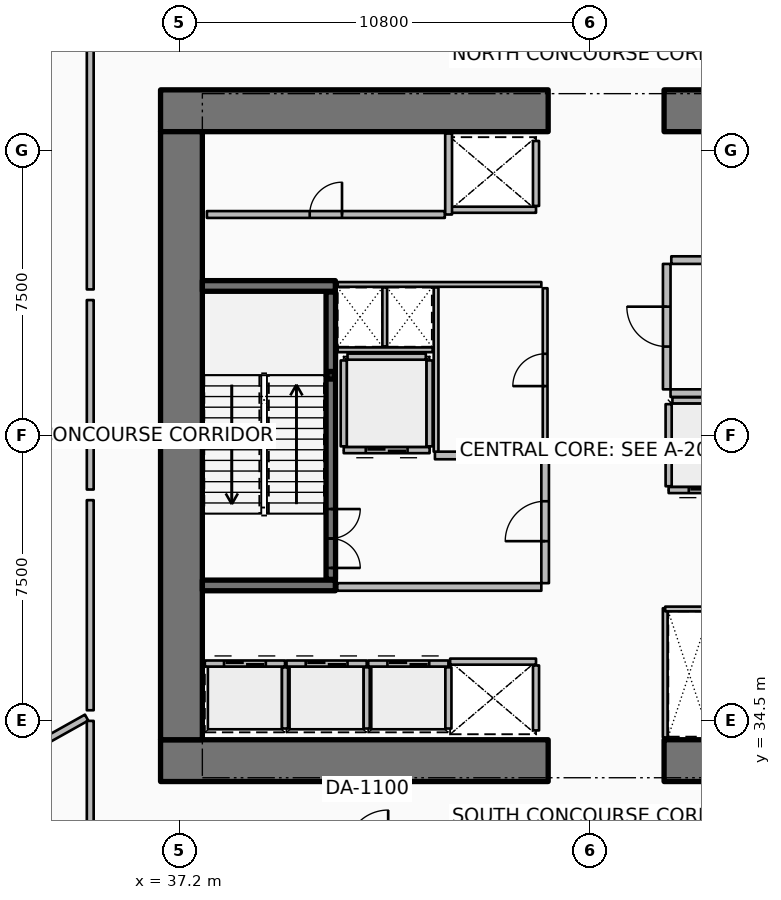
"""IFC4 building model, lengths in metres.
Left out: names, types, materials, properties, quantities, classifications, styles, units other than length and angle.
Written with IfcOpenShell. Run it as: python <this file> out.ifc"""

import sys

from ifc_helpers import new_model, si_unit, direction, frame, frame_2d, origin, origin_2d, place, context, subcontext, project, spatial, rectangle, hollow_rectangle, extrude, element, fill, save


model = new_model("IFC4")
c1 = context("Model", 3, precision=1e-05, world=origin(), true_north=direction((0.0, 1.0)))
c2 = subcontext(c1, "Body", "Model", "MODEL_VIEW")
j1 = project(units=[si_unit("LENGTHUNIT", "METRE"), si_unit("PLANEANGLEUNIT", "RADIAN")], contexts=[c1])
p1 = place(None, origin())
s1 = spatial("IfcSite", under=j1, at=p1, CompositionType="ELEMENT")
p2 = place(p1, origin())
s2 = spatial("IfcBuilding", under=s1, at=p2, CompositionType="ELEMENT")
p3 = place(p2, frame((0.0, 0.0, 21.6)))
s3 = spatial("IfcBuildingStorey", under=s2, at=p3, CompositionType="ELEMENT", Elevation=21.6)
for number, where, z_axis, x_axis in (
    (1, (36.7, 33.45, 0.0), (0.0, 0.0, 1.0), (1.0, 0.0, 0.0)),
    (2, (49.95, 33.45, 0.0), (0.0, 0.0, 1.0), (1.0, 0.0, 0.0)),
    (3, (36.7, 50.55, 0.0), (0.0, 0.0, 1.0), (1.0, 0.0, 0.0)),
    (4, (49.95, 50.55, 0.0), (0.0, 0.0, 1.0), (1.0, 0.0, 0.0)),
):
    element("IfcWall", number, at=place(p3, frame(where, z_axis=z_axis, x_axis=x_axis)), inside=s3, PredefinedType="SHEAR", context=c2, shape_type="SweptSolid", body=[
        extrude(rectangle(XDim=10.2, YDim=1.1, at=frame_2d((5.1, 0.0))), origin(), (0.0, 0.0, 1.0), 4.8),
    ])
p4 = place(p3, frame((37.25, 34.0, 0.0), z_axis=(0.0, 0.0, 1.0), x_axis=(0.0, 1.0, 0.0)))
e5 = element("IfcWall", 5, at=p4, inside=s3, PredefinedType="SHEAR", context=c2, shape_type="SweptSolid", body=[
    extrude(rectangle(XDim=16.0, YDim=1.1, at=frame_2d((8.0, 0.0))), origin(), (0.0, 0.0, 1.0), 4.8),
])
for number, where, z_axis, x_axis in (
    (6, (37.8, 38.06, 0.0), (0.0, 0.0, 1.0), (1.0, 0.0, 0.0)),
    (7, (37.8, 45.94, 0.0), (0.0, 0.0, 1.0), (1.0, 0.0, 0.0)),
):
    element("IfcWall", number, at=place(p3, frame(where, z_axis=z_axis, x_axis=x_axis)), inside=s3, PredefinedType="SHEAR", context=c2, shape_type="SweptSolid", body=[
        extrude(rectangle(XDim=3.5, YDim=0.28, at=frame_2d((1.75, 0.0))), origin(), (0.0, 0.0, 1.0), 4.8),
    ])
p5 = place(p3, frame((41.18, 43.59, 0.0), z_axis=(0.0, 0.0, 1.0), x_axis=(1.0, 0.0, 0.0)))
e8 = element("IfcColumn", 8, at=p5, inside=s3, PredefinedType="COLUMN", context=c2, shape_type="SweptSolid", body=[
    extrude(hollow_rectangle(XDim=0.2, YDim=0.2, WallThickness=0.01, InnerFilletRadius=0.01, OuterFilletRadius=0.02, at=origin_2d()), origin(), (0.0, 0.0, 1.0), 2.195),
])
p6 = place(p3, frame((41.18, 38.22, 0.0), z_axis=(0.0, 0.0, 1.0), x_axis=(0.0, 1.0, 0.0)))
e9 = element("IfcWall", 9, at=p6, inside=s3, PredefinedType="SOLIDWALL", context=c2, shape_type="SweptSolid", body=[
    extrude(rectangle(XDim=7.56, YDim=0.25, at=frame_2d((3.78, 0.0))), origin(), (0.0, 0.0, 1.0), 4.4),
])
p7 = place(p6, frame((0.3, 0.0, 0.0)))
e10 = element("IfcOpeningElement", 10, at=p7, cuts=e9, PredefinedType="OPENING", context=c2, shape_type="SweptSolid", body=[
    extrude(rectangle(XDim=1.55, YDim=2.15, at=frame_2d((0.775, 1.075))), frame((0.0, 0.135, 0.0), z_axis=(0.0, -1.0, 0.0), x_axis=(1.0, 0.0, 0.0)), (0.0, 0.0, 1.0), 0.27),
])
p8 = place(p3, frame((37.865, 36.005, 0.0), z_axis=(0.0, 0.0, 1.0), x_axis=(1.0, 0.0, 0.0)))
e11 = element("IfcWall", 11, at=p8, inside=s3, PredefinedType="PARTITIONING", context=c2, shape_type="SweptSolid", body=[
    extrude(rectangle(XDim=2.11, YDim=0.16, at=frame_2d((1.055, 0.0))), origin(), (0.0, 0.0, 1.0), 4.4),
])
p9 = place(p8, frame((0.505, 0.0, 0.0)))
e12 = element("IfcOpeningElement", 12, at=p9, cuts=e11, PredefinedType="OPENING", context=c2, shape_type="SweptSolid", body=[
    extrude(rectangle(XDim=1.1, YDim=2.1, at=frame_2d((0.55, 1.05))), frame((0.0, 0.09, 0.0), z_axis=(0.0, -1.0, 0.0), x_axis=(1.0, 0.0, 0.0)), (0.0, 0.0, 1.0), 0.18),
])
p10 = place(p3, frame((39.975, 34.295, 0.0), z_axis=(0.0, 0.0, 1.0), x_axis=(0.0, 1.0, 0.0)))
e13 = element("IfcWall", 13, at=p10, inside=s3, PredefinedType="PARTITIONING", context=c2, shape_type="SweptSolid", body=[
    extrude(rectangle(XDim=1.61, YDim=0.16, at=frame_2d((0.805, 0.0))), origin(), (0.0, 0.0, 1.0), 4.4),
])
p11 = place(p3, frame((40.015, 36.005, 0.0), z_axis=(0.0, 0.0, 1.0), x_axis=(1.0, 0.0, 0.0)))
e14 = element("IfcWall", 14, at=p11, inside=s3, PredefinedType="PARTITIONING", context=c2, shape_type="SweptSolid", body=[
    extrude(rectangle(XDim=2.11, YDim=0.16, at=frame_2d((1.055, 0.0))), origin(), (0.0, 0.0, 1.0), 4.4),
])
p12 = place(p11, frame((0.505, 0.0, 0.0)))
e15 = element("IfcOpeningElement", 15, at=p12, cuts=e14, PredefinedType="OPENING", context=c2, shape_type="SweptSolid", body=[
    extrude(rectangle(XDim=1.1, YDim=2.1, at=frame_2d((0.55, 1.05))), frame((0.0, 0.09, 0.0), z_axis=(0.0, -1.0, 0.0), x_axis=(1.0, 0.0, 0.0)), (0.0, 0.0, 1.0), 0.18),
])
p13 = place(p3, frame((42.125, 34.295, 0.0), z_axis=(0.0, 0.0, 1.0), x_axis=(0.0, 1.0, 0.0)))
e16 = element("IfcWall", 16, at=p13, inside=s3, PredefinedType="PARTITIONING", context=c2, shape_type="SweptSolid", body=[
    extrude(rectangle(XDim=1.61, YDim=0.16, at=frame_2d((0.805, 0.0))), origin(), (0.0, 0.0, 1.0), 4.4),
])
p14 = place(p3, frame((42.165, 36.005, 0.0), z_axis=(0.0, 0.0, 1.0), x_axis=(1.0, 0.0, 0.0)))
e17 = element("IfcWall", 17, at=p14, inside=s3, PredefinedType="PARTITIONING", context=c2, shape_type="SweptSolid", body=[
    extrude(rectangle(XDim=2.11, YDim=0.16, at=frame_2d((1.055, 0.0))), origin(), (0.0, 0.0, 1.0), 4.4),
])
p15 = place(p14, frame((0.505, 0.0, 0.0)))
e18 = element("IfcOpeningElement", 18, at=p15, cuts=e17, PredefinedType="OPENING", context=c2, shape_type="SweptSolid", body=[
    extrude(rectangle(XDim=1.1, YDim=2.1, at=frame_2d((0.55, 1.05))), frame((0.0, 0.09, 0.0), z_axis=(0.0, -1.0, 0.0), x_axis=(1.0, 0.0, 0.0)), (0.0, 0.0, 1.0), 0.18),
])
p16 = place(p3, frame((44.275, 34.295, 0.0), z_axis=(0.0, 0.0, 1.0), x_axis=(0.0, 1.0, 0.0)))
e19 = element("IfcWall", 19, at=p16, inside=s3, PredefinedType="PARTITIONING", context=c2, shape_type="SweptSolid", body=[
    extrude(rectangle(XDim=1.61, YDim=0.16, at=frame_2d((0.805, 0.0))), origin(), (0.0, 0.0, 1.0), 4.4),
])
p17 = place(p3, frame((46.58, 47.945, 0.0), z_axis=(0.0, 0.0, 1.0), x_axis=(-1.0, 0.0, 0.0)))
e20 = element("IfcWall", 20, at=p17, inside=s3, PredefinedType="PARTITIONING", context=c2, shape_type="SweptSolid", body=[
    extrude(rectangle(XDim=2.26, YDim=0.16, at=frame_2d((1.13, 0.0))), origin(), (0.0, 0.0, 1.0), 4.4),
])
p18 = place(p3, frame((46.58, 48.045, 0.0), z_axis=(0.0, 0.0, 1.0), x_axis=(0.0, 1.0, 0.0)))
e21 = element("IfcWall", 21, at=p18, inside=s3, PredefinedType="PARTITIONING", context=c2, shape_type="SweptSolid", body=[
    extrude(rectangle(XDim=1.71, YDim=0.16, at=frame_2d((0.855, 0.0))), origin(), (0.0, 0.0, 1.0), 4.4),
])
p19 = place(p3, frame((44.32, 36.055, 0.0), z_axis=(0.0, 0.0, 1.0), x_axis=(1.0, 0.0, 0.0)))
e22 = element("IfcWall", 22, at=p19, inside=s3, PredefinedType="PARTITIONING", context=c2, shape_type="SweptSolid", body=[
    extrude(rectangle(XDim=2.26, YDim=0.16, at=frame_2d((1.13, 0.0))), origin(), (0.0, 0.0, 1.0), 4.4),
])
p20 = place(p3, frame((46.58, 34.245, 0.0), z_axis=(0.0, 0.0, 1.0), x_axis=(0.0, 1.0, 0.0)))
e23 = element("IfcWall", 23, at=p20, inside=s3, PredefinedType="PARTITIONING", context=c2, shape_type="SweptSolid", body=[
    extrude(rectangle(XDim=1.71, YDim=0.16, at=frame_2d((0.855, 0.0))), origin(), (0.0, 0.0, 1.0), 4.4),
])
p21 = place(p3, frame((43.78, 41.62, 0.0), z_axis=(0.0, 0.0, 1.0), x_axis=(-1.0, 0.0, 0.0)))
e24 = element("IfcWall", 24, at=p21, inside=s3, PredefinedType="PARTITIONING", context=c2, shape_type="SweptSolid", body=[
    extrude(rectangle(XDim=2.26, YDim=0.16, at=frame_2d((1.13, 0.0))), origin(), (0.0, 0.0, 1.0), 4.4),
])
p22 = place(p21, frame((0.58, 0.0, 0.0)))
e25 = element("IfcOpeningElement", 25, at=p22, cuts=e24, PredefinedType="OPENING", context=c2, shape_type="SweptSolid", body=[
    extrude(rectangle(XDim=1.1, YDim=2.1, at=frame_2d((0.55, 1.05))), frame((0.0, 0.09, 0.0), z_axis=(0.0, -1.0, 0.0), x_axis=(1.0, 0.0, 0.0)), (0.0, 0.0, 1.0), 0.18),
])
for number, where, z_axis, x_axis in (
    (26, (43.78, 41.72, 0.0), (0.0, 0.0, 1.0), (0.0, 1.0, 0.0)),
    (27, (41.52, 41.72, 0.0), (0.0, 0.0, 1.0), (0.0, 1.0, 0.0)),
):
    element("IfcWall", number, at=place(p3, frame(where, z_axis=z_axis, x_axis=x_axis)), inside=s3, PredefinedType="PARTITIONING", context=c2, shape_type="SweptSolid", body=[
        extrude(rectangle(XDim=2.26, YDim=0.16, at=frame_2d((1.13, 0.0))), origin(), (0.0, 0.0, 1.0), 4.4),
    ])
p23 = place(p3, frame((41.62, 44.08, 0.0), z_axis=(0.0, 0.0, 1.0), x_axis=(1.0, 0.0, 0.0)))
e28 = element("IfcWall", 28, at=p23, inside=s3, PredefinedType="PARTITIONING", context=c2, shape_type="SweptSolid", body=[
    extrude(rectangle(XDim=2.06, YDim=0.16, at=frame_2d((1.03, 0.0))), origin(), (0.0, 0.0, 1.0), 4.4),
])
p24 = place(p3, frame((52.23, 40.57, 0.0), z_axis=(0.0, 0.0, 1.0), x_axis=(-1.0, 0.0, 0.0)))
e29 = element("IfcWall", 29, at=p24, inside=s3, PredefinedType="PARTITIONING", context=c2, shape_type="SweptSolid", body=[
    extrude(rectangle(XDim=2.16, YDim=0.16, at=frame_2d((1.08, 0.0))), origin(), (0.0, 0.0, 1.0), 4.4),
])
p25 = place(p24, frame((0.53, 0.0, 0.0)))
e30 = element("IfcOpeningElement", 30, at=p25, cuts=e29, PredefinedType="OPENING", context=c2, shape_type="SweptSolid", body=[
    extrude(rectangle(XDim=1.1, YDim=2.1, at=frame_2d((0.55, 1.05))), frame((0.0, 0.09, 0.0), z_axis=(0.0, -1.0, 0.0), x_axis=(1.0, 0.0, 0.0)), (0.0, 0.0, 1.0), 0.18),
])
p26 = place(p3, frame((50.07, 40.67, 0.0), z_axis=(0.0, 0.0, 1.0), x_axis=(0.0, 1.0, 0.0)))
e31 = element("IfcWall", 31, at=p26, inside=s3, PredefinedType="PARTITIONING", context=c2, shape_type="SweptSolid", body=[
    extrude(rectangle(XDim=2.16, YDim=0.16, at=frame_2d((1.08, 0.0))), origin(), (0.0, 0.0, 1.0), 4.4),
])
p27 = place(p3, frame((50.17, 42.93, 0.0), z_axis=(0.0, 0.0, 1.0), x_axis=(1.0, 0.0, 0.0)))
e32 = element("IfcWall", 32, at=p27, inside=s3, PredefinedType="PARTITIONING", context=c2, shape_type="SweptSolid", body=[
    extrude(rectangle(XDim=1.96, YDim=0.16, at=frame_2d((0.98, 0.0))), origin(), (0.0, 0.0, 1.0), 4.4),
])
p28 = place(p3, frame((37.92, 47.82, 0.0), z_axis=(0.0, 0.0, 1.0), x_axis=(1.0, 0.0, 0.0)))
e33 = element("IfcWall", 33, at=p28, inside=s3, PredefinedType="PARTITIONING", context=c2, shape_type="SweptSolid", body=[
    extrude(rectangle(XDim=6.26, YDim=0.18, at=frame_2d((3.13, 0.0))), origin(), (0.0, 0.0, 1.0), 4.4),
])
p29 = place(p28, frame((2.705, 0.0, 0.0)))
e34 = element("IfcOpeningElement", 34, at=p29, cuts=e33, PredefinedType="OPENING", context=c2, shape_type="SweptSolid", body=[
    extrude(rectangle(XDim=0.85, YDim=2.06, at=frame_2d((0.425, 1.03))), frame((0.0, 0.1, 0.0), z_axis=(0.0, -1.0, 0.0), x_axis=(1.0, 0.0, 0.0)), (0.0, 0.0, 1.0), 0.2),
])
p30 = place(p3, frame((44.28, 47.82, 0.0), z_axis=(0.0, 0.0, 1.0), x_axis=(0.0, 1.0, 0.0)))
e35 = element("IfcWall", 35, at=p30, inside=s3, PredefinedType="PARTITIONING", context=c2, shape_type="SweptSolid", body=[
    extrude(rectangle(XDim=2.13, YDim=0.18, at=frame_2d((1.065, 0.0))), origin(), (0.0, 0.0, 1.0), 4.4),
])
p31 = place(p3, frame((41.35, 38.02, 0.0), z_axis=(0.0, 0.0, 1.0), x_axis=(1.0, 0.0, 0.0)))
e36 = element("IfcWall", 36, at=p31, inside=s3, PredefinedType="PARTITIONING", context=c2, shape_type="SweptSolid", body=[
    extrude(rectangle(XDim=5.37, YDim=0.2, at=frame_2d((2.685, 0.0))), origin(), (0.0, 0.0, 1.0), 4.4),
])
p32 = place(p3, frame((43.92, 41.48, 0.0), z_axis=(0.0, 0.0, 1.0), x_axis=(1.0, 0.0, 0.0)))
e37 = element("IfcWall", 37, at=p32, inside=s3, PredefinedType="PARTITIONING", context=c2, shape_type="SweptSolid", body=[
    extrude(rectangle(XDim=2.8, YDim=0.2, at=frame_2d((1.4, 0.0))), origin(), (0.0, 0.0, 1.0), 4.4),
])
p33 = place(p3, frame((46.82, 38.12, 0.0), z_axis=(0.0, 0.0, 1.0), x_axis=(0.0, 1.0, 0.0)))
e38 = element("IfcWall", 38, at=p33, inside=s3, PredefinedType="PARTITIONING", context=c2, shape_type="SweptSolid", body=[
    extrude(rectangle(XDim=3.26, YDim=0.2, at=frame_2d((1.63, 0.0))), origin(), (0.0, 0.0, 1.0), 4.4),
])
p34 = place(p33, frame((1.105, 0.0, 0.0)))
e39 = element("IfcOpeningElement", 39, at=p34, cuts=e38, PredefinedType="OPENING", context=c2, shape_type="SweptSolid", body=[
    extrude(rectangle(XDim=1.05, YDim=2.1, at=frame_2d((0.525, 1.05))), frame((0.0, 0.11, 0.0), z_axis=(0.0, -1.0, 0.0), x_axis=(1.0, 0.0, 0.0)), (0.0, 0.0, 1.0), 0.22),
])
p35 = place(p3, frame((50.12, 43.12, 0.0), z_axis=(0.0, 0.0, 1.0), x_axis=(1.0, 0.0, 0.0)))
e40 = element("IfcWall", 40, at=p35, inside=s3, PredefinedType="PARTITIONING", context=c2, shape_type="SweptSolid", body=[
    extrude(rectangle(XDim=8.88, YDim=0.2, at=frame_2d((4.44, 0.0))), origin(), (0.0, 0.0, 1.0), 4.4),
])
p36 = place(p3, frame((50.14, 46.62, 0.0), z_axis=(0.0, 0.0, 1.0), x_axis=(1.0, 0.0, 0.0)))
e41 = element("IfcWall", 41, at=p36, inside=s3, PredefinedType="PARTITIONING", context=c2, shape_type="SweptSolid", body=[
    extrude(rectangle(XDim=1.02, YDim=0.2, at=frame_2d((0.51, 0.0))), origin(), (0.0, 0.0, 1.0), 4.4),
])
p37 = place(p3, frame((50.02, 43.22, 0.0), z_axis=(0.0, 0.0, 1.0), x_axis=(0.0, 1.0, 0.0)))
e42 = element("IfcWall", 42, at=p37, inside=s3, PredefinedType="PARTITIONING", context=c2, shape_type="SweptSolid", body=[
    extrude(rectangle(XDim=3.3, YDim=0.2, at=frame_2d((1.65, 0.0))), origin(), (0.0, 0.0, 1.0), 4.4),
])
p38 = place(p37, frame((1.125, 0.0, 0.0)))
e43 = element("IfcOpeningElement", 43, at=p38, cuts=e42, PredefinedType="OPENING", context=c2, shape_type="SweptSolid", body=[
    extrude(rectangle(XDim=1.05, YDim=2.1, at=frame_2d((0.525, 1.05))), frame((0.0, 0.11, 0.0), z_axis=(0.0, -1.0, 0.0), x_axis=(1.0, 0.0, 0.0)), (0.0, 0.0, 1.0), 0.22),
])
p39 = place(p3, frame((41.36, 45.98, 0.0), z_axis=(0.0, 0.0, 1.0), x_axis=(1.0, 0.0, 0.0)))
e44 = element("IfcWall", 44, at=p39, inside=s3, PredefinedType="PARTITIONING", context=c2, shape_type="SweptSolid", body=[
    extrude(rectangle(XDim=5.36, YDim=0.125, at=frame_2d((2.68, 0.0))), origin(), (0.0, 0.0, 1.0), 3.84),
])
p40 = place(p3, frame((41.36, 44.26, 0.0), z_axis=(0.0, 0.0, 1.0), x_axis=(1.0, 0.0, 0.0)))
e45 = element("IfcWall", 45, at=p40, inside=s3, PredefinedType="PARTITIONING", context=c2, shape_type="SweptSolid", body=[
    extrude(rectangle(XDim=2.5, YDim=0.125, at=frame_2d((1.25, 0.0))), origin(), (0.0, 0.0, 1.0), 3.84),
])
p41 = place(p3, frame((42.6, 44.35, 0.0), z_axis=(0.0, 0.0, 1.0), x_axis=(0.0, 1.0, 0.0)))
e46 = element("IfcWall", 46, at=p41, inside=s3, PredefinedType="PARTITIONING", context=c2, shape_type="SweptSolid", body=[
    extrude(rectangle(XDim=1.55, YDim=0.125, at=frame_2d((0.775, 0.0))), origin(), (0.0, 0.0, 1.0), 3.84),
])
p42 = place(p3, frame((49.98, 34.06, 0.0), z_axis=(0.0, 0.0, 1.0), x_axis=(0.0, 1.0, 0.0)))
e47 = element("IfcWall", 47, at=p42, inside=s3, PredefinedType="PARTITIONING", context=c2, shape_type="SweptSolid", body=[
    extrude(rectangle(XDim=3.4, YDim=0.125, at=frame_2d((1.7, 0.0))), origin(), (0.0, 0.0, 1.0), 3.84),
])
p43 = place(p3, frame((49.98, 37.44, 0.0), z_axis=(0.0, 0.0, 1.0), x_axis=(1.0, 0.0, 0.0)))
e48 = element("IfcWall", 48, at=p43, inside=s3, PredefinedType="PARTITIONING", context=c2, shape_type="SweptSolid", body=[
    extrude(rectangle(XDim=1.26, YDim=0.125, at=frame_2d((0.63, 0.0))), origin(), (0.0, 0.0, 1.0), 3.84),
])
p44 = place(p3, frame((43.95, 41.58, 0.0), z_axis=(0.0, 0.0, 1.0), x_axis=(0.0, 1.0, 0.0)))
e49 = element("IfcWall", 49, at=p44, inside=s3, PredefinedType="PARTITIONING", context=c2, shape_type="SweptSolid", body=[
    extrude(rectangle(XDim=4.32, YDim=0.125, at=frame_2d((2.16, 0.0))), origin(), (0.0, 0.0, 1.0), 3.84),
])
p45 = place(p3, frame((46.82, 41.58, 0.0), z_axis=(0.0, 0.0, 1.0), x_axis=(0.0, 1.0, 0.0)))
e50 = element("IfcWall", 50, at=p45, inside=s3, PredefinedType="PARTITIONING", context=c2, shape_type="SweptSolid", body=[
    extrude(rectangle(XDim=4.3, YDim=0.125, at=frame_2d((2.15, 0.0))), origin(), (0.0, 0.0, 1.0), 3.84),
])
p46 = place(p45, frame((1.725, 0.0, 0.0)))
e51 = element("IfcOpeningElement", 51, at=p46, cuts=e50, PredefinedType="OPENING", context=c2, shape_type="SweptSolid", body=[
    extrude(rectangle(XDim=0.85, YDim=2.06, at=frame_2d((0.425, 1.03))), frame((0.0, 0.073, 0.0), z_axis=(0.0, -1.0, 0.0), x_axis=(1.0, 0.0, 0.0)), (0.0, 0.0, 1.0), 0.145),
])
p47 = place(p3, frame((34.85, 52.227, 0.0), z_axis=(0.0, 0.0, 1.0), x_axis=(0.0, -1.0, 0.0)))
e52 = element("IfcWall", 52, at=p47, inside=s3, PredefinedType="PARTITIONING", context=c2, shape_type="SweptSolid", body=[
    extrude(rectangle(XDim=6.378, YDim=0.18, at=frame_2d((3.189, 0.0))), origin(), (0.0, 0.0, 1.0), 3.357),
])
p48 = place(p3, frame((34.85, 45.569, 0.0), z_axis=(0.0, 0.0, 1.0), x_axis=(0.0, -1.0, 0.0)))
e53 = element("IfcWall", 53, at=p48, inside=s3, PredefinedType="PARTITIONING", context=c2, shape_type="SweptSolid", body=[
    extrude(rectangle(XDim=4.985, YDim=0.18, at=frame_2d((2.493, 0.0))), origin(), (0.0, 0.0, 1.0), 3.357),
])
p49 = place(p3, frame((34.85, 40.304, 0.0), z_axis=(0.0, 0.0, 1.0), x_axis=(0.0, -1.0, 0.0)))
e54 = element("IfcWall", 54, at=p49, inside=s3, PredefinedType="PARTITIONING", context=c2, shape_type="SweptSolid", body=[
    extrude(rectangle(XDim=5.528, YDim=0.18, at=frame_2d((2.764, 0.0))), origin(), (0.0, 0.0, 1.0), 3.357),
])
p50 = place(p3, frame((34.754, 34.582, 0.0), z_axis=(0.0, 0.0, 1.0), x_axis=(-0.872493211438, -0.488626233429, 0.0)))
e55 = element("IfcWall", 55, at=p50, inside=s3, PredefinedType="PARTITIONING", context=c2, shape_type="SweptSolid", body=[
    extrude(rectangle(XDim=20.159, YDim=0.18, at=frame_2d((10.079, 0.0))), origin(), (0.0, 0.0, 1.0), 3.357),
])
p51 = place(p3, frame((34.85, 34.496, 0.0), z_axis=(0.0, 0.0, 1.0), x_axis=(0.0, -1.0, 0.0)))
e56 = element("IfcWall", 56, at=p51, inside=s3, PredefinedType="PARTITIONING", context=c2, shape_type="SweptSolid", body=[
    extrude(rectangle(XDim=3.306, YDim=0.18, at=frame_2d((1.653, 0.0))), origin(), (0.0, 0.0, 1.0), 3.357),
])
p52 = place(p7, origin())
e57 = element("IfcDoor", 57, at=p52, inside=s3, OperationType="DOUBLE_DOOR_SINGLE_SWING", PredefinedType="DOOR", context=c2, shape_type="SweptSolid", body=[
    extrude(rectangle(XDim=1.55, YDim=2.15, at=frame_2d((0.775, 1.075))), frame((0.0, 0.025, 0.0), z_axis=(0.0, -1.0, 0.0), x_axis=(1.0, 0.0, 0.0)), (0.0, 0.0, 1.0), 0.05),
])
fill(e10, e57)
p53 = place(p9, origin())
e58 = element("IfcDoor", 58, at=p53, inside=s3, OperationType="DOUBLE_DOOR_SLIDING", PredefinedType="DOOR", context=c2, shape_type="SweptSolid", body=[
    extrude(rectangle(XDim=1.1, YDim=2.1, at=frame_2d((0.55, 1.05))), frame((0.0, 0.025, 0.0), z_axis=(0.0, -1.0, 0.0), x_axis=(1.0, 0.0, 0.0)), (0.0, 0.0, 1.0), 0.05),
])
fill(e12, e58)
p54 = place(p12, origin())
e59 = element("IfcDoor", 59, at=p54, inside=s3, OperationType="DOUBLE_DOOR_SLIDING", PredefinedType="DOOR", context=c2, shape_type="SweptSolid", body=[
    extrude(rectangle(XDim=1.1, YDim=2.1, at=frame_2d((0.55, 1.05))), frame((0.0, 0.025, 0.0), z_axis=(0.0, -1.0, 0.0), x_axis=(1.0, 0.0, 0.0)), (0.0, 0.0, 1.0), 0.05),
])
fill(e15, e59)
p55 = place(p15, origin())
e60 = element("IfcDoor", 60, at=p55, inside=s3, OperationType="DOUBLE_DOOR_SLIDING", PredefinedType="DOOR", context=c2, shape_type="SweptSolid", body=[
    extrude(rectangle(XDim=1.1, YDim=2.1, at=frame_2d((0.55, 1.05))), frame((0.0, 0.025, 0.0), z_axis=(0.0, -1.0, 0.0), x_axis=(1.0, 0.0, 0.0)), (0.0, 0.0, 1.0), 0.05),
])
fill(e18, e60)
p56 = place(p22, origin())
e61 = element("IfcDoor", 61, at=p56, inside=s3, OperationType="DOUBLE_DOOR_SLIDING", PredefinedType="DOOR", context=c2, shape_type="SweptSolid", body=[
    extrude(rectangle(XDim=1.1, YDim=2.1, at=frame_2d((0.55, 1.05))), frame((0.0, 0.025, 0.0), z_axis=(0.0, -1.0, 0.0), x_axis=(1.0, 0.0, 0.0)), (0.0, 0.0, 1.0), 0.05),
])
fill(e25, e61)
p57 = place(p25, origin())
e62 = element("IfcDoor", 62, at=p57, inside=s3, OperationType="DOUBLE_DOOR_SLIDING", PredefinedType="DOOR", context=c2, shape_type="SweptSolid", body=[
    extrude(rectangle(XDim=1.1, YDim=2.1, at=frame_2d((0.55, 1.05))), frame((0.0, 0.025, 0.0), z_axis=(0.0, -1.0, 0.0), x_axis=(1.0, 0.0, 0.0)), (0.0, 0.0, 1.0), 0.05),
])
fill(e30, e62)
p58 = place(p29, origin())
e63 = element("IfcDoor", 63, at=p58, inside=s3, OperationType="SINGLE_SWING_RIGHT", PredefinedType="DOOR", context=c2, shape_type="SweptSolid", body=[
    extrude(rectangle(XDim=0.85, YDim=2.06, at=frame_2d((0.425, 1.03))), frame((0.0, 0.025, 0.0), z_axis=(0.0, -1.0, 0.0), x_axis=(1.0, 0.0, 0.0)), (0.0, 0.0, 1.0), 0.05),
])
fill(e34, e63)
p59 = place(p34, origin())
e64 = element("IfcDoor", 64, at=p59, inside=s3, OperationType="SINGLE_SWING_LEFT", PredefinedType="DOOR", context=c2, shape_type="SweptSolid", body=[
    extrude(rectangle(XDim=1.05, YDim=2.1, at=frame_2d((0.525, 1.05))), frame((0.0, 0.025, 0.0), z_axis=(0.0, -1.0, 0.0), x_axis=(1.0, 0.0, 0.0)), (0.0, 0.0, 1.0), 0.05),
])
fill(e39, e64)
p60 = place(p38, origin())
e65 = element("IfcDoor", 65, at=p60, inside=s3, OperationType="SINGLE_SWING_RIGHT", PredefinedType="DOOR", context=c2, shape_type="SweptSolid", body=[
    extrude(rectangle(XDim=1.05, YDim=2.1, at=frame_2d((0.525, 1.05))), frame((0.0, 0.025, 0.0), z_axis=(0.0, -1.0, 0.0), x_axis=(1.0, 0.0, 0.0)), (0.0, 0.0, 1.0), 0.05),
])
fill(e43, e65)
p61 = place(p46, origin())
e66 = element("IfcDoor", 66, at=p61, inside=s3, OperationType="SINGLE_SWING_LEFT", PredefinedType="DOOR", context=c2, shape_type="SweptSolid", body=[
    extrude(rectangle(XDim=0.85, YDim=2.06, at=frame_2d((0.425, 1.03))), frame((0.0, 0.025, 0.0), z_axis=(0.0, -1.0, 0.0), x_axis=(1.0, 0.0, 0.0)), (0.0, 0.0, 1.0), 0.05),
])
fill(e51, e66)
save(model, sys.argv[1])
